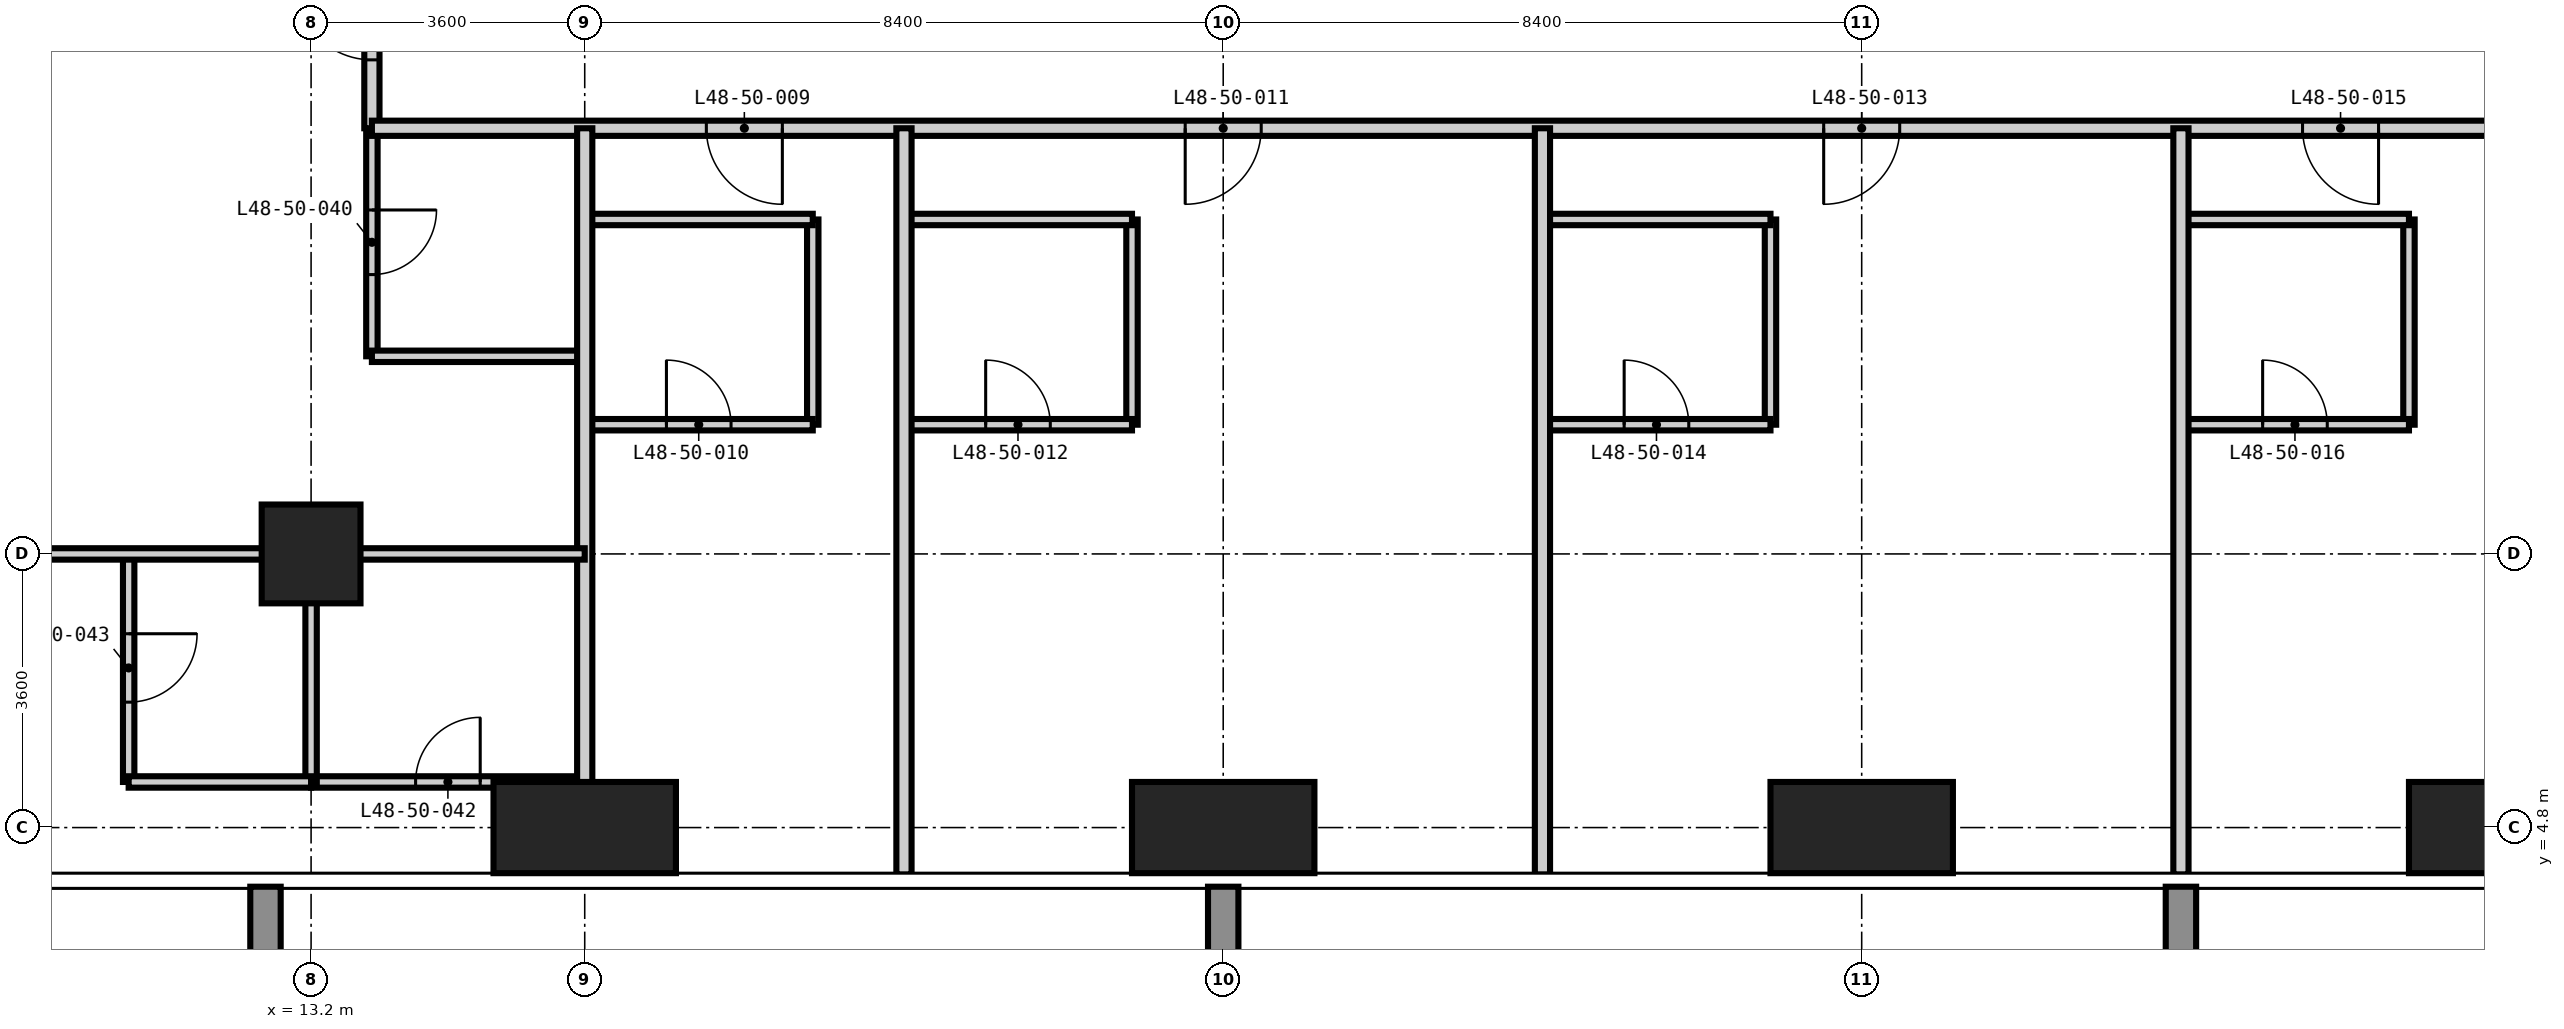
"""IFC4 building model, lengths in metres.
Left out: names, types, materials, properties, quantities, classifications, styles, units other than length and angle.
Written with IfcOpenShell. Run it as: python <this file> out.ifc"""

import sys

from ifc_helpers import new_model, si_unit, direction, frame, frame_2d, origin, origin_2d, place, context, subcontext, project, spatial, rectangle, extrude, element, fill, save


model = new_model("IFC4")
c1 = context("Model", 3, precision=1e-05, world=origin(), true_north=direction((0.0, 1.0)))
c2 = subcontext(c1, "Body", "Model", "MODEL_VIEW")
j1 = project(units=[si_unit("LENGTHUNIT", "METRE"), si_unit("PLANEANGLEUNIT", "RADIAN")], contexts=[c1])
p1 = place(None, origin())
s1 = spatial("IfcSite", under=j1, at=p1, CompositionType="ELEMENT")
p2 = place(p1, origin())
s2 = spatial("IfcBuilding", under=s1, at=p2, CompositionType="ELEMENT")
p3 = place(p2, frame((0.0, 0.0, 187.8)))
s3 = spatial("IfcBuildingStorey", under=s2, at=p3, CompositionType="ELEMENT", Elevation=187.8)
p4 = place(p3, frame((13.2, 8.4, -0.35), z_axis=(0.0, 0.0, 1.0), x_axis=(1.0, 0.0, 0.0)))
e1 = element("IfcColumn", 1, at=p4, inside=s3, PredefinedType="COLUMN", context=c2, shape_type="SweptSolid", body=[
    extrude(rectangle(XDim=1.3, YDim=1.3, at=origin_2d()), origin(), (0.0, 0.0, 1.0), 3.6),
])
for number, where, z_axis, x_axis in (
    (2, (16.8, 4.8, -0.35), (0.0, 0.0, 1.0), (1.0, 0.0, 0.0)),
    (3, (25.2, 4.8, -0.35), (0.0, 0.0, 1.0), (1.0, 0.0, 0.0)),
    (4, (33.6, 4.8, -0.35), (0.0, 0.0, 1.0), (1.0, 0.0, 0.0)),
    (5, (42.0, 4.8, -0.35), (0.0, 0.0, 1.0), (1.0, 0.0, 0.0)),
):
    element("IfcColumn", number, at=place(p3, frame(where, z_axis=z_axis, x_axis=x_axis)), inside=s3, PredefinedType="COLUMN", context=c2, shape_type="SweptSolid", body=[
        extrude(rectangle(XDim=2.4, YDim=1.2, at=origin_2d()), origin(), (0.0, 0.0, 1.0), 3.6),
    ])
p5 = place(p3, frame((14.0, 11.0, 0.0), z_axis=(0.0, 0.0, 1.0), x_axis=(0.0, 1.0, 0.0)))
e6 = element("IfcWall", 6, at=p5, inside=s3, PredefinedType="PARTITIONING", context=c2, shape_type="SweptSolid", body=[
    extrude(rectangle(XDim=3.0, YDim=0.15, at=frame_2d((1.5, 0.0))), origin(), (0.0, 0.0, 1.0), 3.25),
])
p6 = place(p5, frame((1.075, 0.0, 0.0)))
e7 = element("IfcOpeningElement", 7, at=p6, cuts=e6, PredefinedType="OPENING", context=c2, shape_type="SweptSolid", body=[
    extrude(rectangle(XDim=0.85, YDim=2.1, at=frame_2d((0.425, 1.05))), frame((0.0, 0.085, 0.0), z_axis=(0.0, -1.0, 0.0), x_axis=(1.0, 0.0, 0.0)), (0.0, 0.0, 1.0), 0.17),
])
for number, where, z_axis, x_axis in (
    (8, (19.8, 10.1, 0.0), (0.0, 0.0, 1.0), (0.0, 1.0, 0.0)),
    (9, (24.0, 10.1, 0.0), (0.0, 0.0, 1.0), (0.0, 1.0, 0.0)),
    (10, (32.4, 10.1, 0.0), (0.0, 0.0, 1.0), (0.0, 1.0, 0.0)),
    (11, (40.8, 10.1, 0.0), (0.0, 0.0, 1.0), (0.0, 1.0, 0.0)),
):
    element("IfcWall", number, at=place(p3, frame(where, z_axis=z_axis, x_axis=x_axis)), inside=s3, PredefinedType="PARTITIONING", context=c2, shape_type="SweptSolid", body=[
        extrude(rectangle(XDim=2.7, YDim=0.15, at=frame_2d((1.35, 0.0))), origin(), (0.0, 0.0, 1.0), 3.25),
    ])
p7 = place(p3, frame((13.2, 5.4, 0.0), z_axis=(0.0, 0.0, 1.0), x_axis=(1.0, 0.0, 0.0)))
e12 = element("IfcWall", 12, at=p7, inside=s3, PredefinedType="PARTITIONING", context=c2, shape_type="SweptSolid", body=[
    extrude(rectangle(XDim=3.6, YDim=0.15, at=frame_2d((1.8, 0.0))), origin(), (0.0, 0.0, 1.0), 3.25),
])
p8 = place(p7, frame((1.375, 0.0, 0.0)))
e13 = element("IfcOpeningElement", 13, at=p8, cuts=e12, PredefinedType="OPENING", context=c2, shape_type="SweptSolid", body=[
    extrude(rectangle(XDim=0.85, YDim=2.1, at=frame_2d((0.425, 1.05))), frame((0.0, 0.085, 0.0), z_axis=(0.0, -1.0, 0.0), x_axis=(1.0, 0.0, 0.0)), (0.0, 0.0, 1.0), 0.17),
])
p9 = place(p3, frame((16.8, 10.1, 0.0), z_axis=(0.0, 0.0, 1.0), x_axis=(1.0, 0.0, 0.0)))
e14 = element("IfcWall", 14, at=p9, inside=s3, PredefinedType="PARTITIONING", context=c2, shape_type="SweptSolid", body=[
    extrude(rectangle(XDim=3.0, YDim=0.15, at=frame_2d((1.5, 0.0))), origin(), (0.0, 0.0, 1.0), 3.25),
])
p10 = place(p9, frame((1.075, 0.0, 0.0)))
e15 = element("IfcOpeningElement", 15, at=p10, cuts=e14, PredefinedType="OPENING", context=c2, shape_type="SweptSolid", body=[
    extrude(rectangle(XDim=0.85, YDim=2.1, at=frame_2d((0.425, 1.05))), frame((0.0, 0.085, 0.0), z_axis=(0.0, -1.0, 0.0), x_axis=(1.0, 0.0, 0.0)), (0.0, 0.0, 1.0), 0.17),
])
p11 = place(p3, frame((21.0, 10.1, 0.0), z_axis=(0.0, 0.0, 1.0), x_axis=(1.0, 0.0, 0.0)))
e16 = element("IfcWall", 16, at=p11, inside=s3, PredefinedType="PARTITIONING", context=c2, shape_type="SweptSolid", body=[
    extrude(rectangle(XDim=3.0, YDim=0.15, at=frame_2d((1.5, 0.0))), origin(), (0.0, 0.0, 1.0), 3.25),
])
p12 = place(p11, frame((1.075, 0.0, 0.0)))
e17 = element("IfcOpeningElement", 17, at=p12, cuts=e16, PredefinedType="OPENING", context=c2, shape_type="SweptSolid", body=[
    extrude(rectangle(XDim=0.85, YDim=2.1, at=frame_2d((0.425, 1.05))), frame((0.0, 0.085, 0.0), z_axis=(0.0, -1.0, 0.0), x_axis=(1.0, 0.0, 0.0)), (0.0, 0.0, 1.0), 0.17),
])
p13 = place(p3, frame((29.4, 10.1, 0.0), z_axis=(0.0, 0.0, 1.0), x_axis=(1.0, 0.0, 0.0)))
e18 = element("IfcWall", 18, at=p13, inside=s3, PredefinedType="PARTITIONING", context=c2, shape_type="SweptSolid", body=[
    extrude(rectangle(XDim=3.0, YDim=0.15, at=frame_2d((1.5, 0.0))), origin(), (0.0, 0.0, 1.0), 3.25),
])
p14 = place(p13, frame((1.075, 0.0, 0.0)))
e19 = element("IfcOpeningElement", 19, at=p14, cuts=e18, PredefinedType="OPENING", context=c2, shape_type="SweptSolid", body=[
    extrude(rectangle(XDim=0.85, YDim=2.1, at=frame_2d((0.425, 1.05))), frame((0.0, 0.085, 0.0), z_axis=(0.0, -1.0, 0.0), x_axis=(1.0, 0.0, 0.0)), (0.0, 0.0, 1.0), 0.17),
])
p15 = place(p3, frame((37.8, 10.1, 0.0), z_axis=(0.0, 0.0, 1.0), x_axis=(1.0, 0.0, 0.0)))
e20 = element("IfcWall", 20, at=p15, inside=s3, PredefinedType="PARTITIONING", context=c2, shape_type="SweptSolid", body=[
    extrude(rectangle(XDim=3.0, YDim=0.15, at=frame_2d((1.5, 0.0))), origin(), (0.0, 0.0, 1.0), 3.25),
])
p16 = place(p15, frame((1.075, 0.0, 0.0)))
e21 = element("IfcOpeningElement", 21, at=p16, cuts=e20, PredefinedType="OPENING", context=c2, shape_type="SweptSolid", body=[
    extrude(rectangle(XDim=0.85, YDim=2.1, at=frame_2d((0.425, 1.05))), frame((0.0, 0.085, 0.0), z_axis=(0.0, -1.0, 0.0), x_axis=(1.0, 0.0, 0.0)), (0.0, 0.0, 1.0), 0.17),
])
p17 = place(p3, frame((14.0, 11.0, 0.0), z_axis=(0.0, 0.0, 1.0), x_axis=(1.0, 0.0, 0.0)))
e22 = element("IfcWall", 22, at=p17, inside=s3, PredefinedType="PARTITIONING", context=c2, shape_type="SweptSolid", body=[
    extrude(rectangle(XDim=2.8, YDim=0.15, at=frame_2d((1.4, 0.0))), origin(), (0.0, 0.0, 1.0), 3.25),
])
for number, where, z_axis, x_axis in (
    (23, (16.8, 12.8, 0.0), (0.0, 0.0, 1.0), (1.0, 0.0, 0.0)),
    (24, (21.0, 12.8, 0.0), (0.0, 0.0, 1.0), (1.0, 0.0, 0.0)),
    (25, (29.4, 12.8, 0.0), (0.0, 0.0, 1.0), (1.0, 0.0, 0.0)),
    (26, (37.8, 12.8, 0.0), (0.0, 0.0, 1.0), (1.0, 0.0, 0.0)),
):
    element("IfcWall", number, at=place(p3, frame(where, z_axis=z_axis, x_axis=x_axis)), inside=s3, PredefinedType="PARTITIONING", context=c2, shape_type="SweptSolid", body=[
        extrude(rectangle(XDim=3.0, YDim=0.15, at=frame_2d((1.5, 0.0))), origin(), (0.0, 0.0, 1.0), 3.25),
    ])
p18 = place(p3, frame((14.0, 14.0, 0.0), z_axis=(0.0, 0.0, 1.0), x_axis=(0.0, 1.0, 0.0)))
e27 = element("IfcWall", 27, at=p18, inside=s3, PredefinedType="PARTITIONING", context=c2, shape_type="SweptSolid", body=[
    extrude(rectangle(XDim=30.2, YDim=0.2, at=frame_2d((15.1, 0.0))), origin(), (0.0, 0.0, 1.0), 3.25),
])
p19 = place(p18, frame((6.5, 0.0, 0.0)))
e28 = element("IfcOpeningElement", 28, at=p19, cuts=e27, PredefinedType="OPENING", context=c2, shape_type="SweptSolid", body=[
    extrude(rectangle(XDim=1.0, YDim=2.2, at=frame_2d((0.5, 1.1))), frame((0.0, 0.11, 0.0), z_axis=(0.0, -1.0, 0.0), x_axis=(1.0, 0.0, 0.0)), (0.0, 0.0, 1.0), 0.22),
])
p20 = place(p18, frame((14.9, 0.0, 0.0)))
e29 = element("IfcOpeningElement", 29, at=p20, cuts=e27, PredefinedType="OPENING", context=c2, shape_type="SweptSolid", body=[
    extrude(rectangle(XDim=1.0, YDim=2.2, at=frame_2d((0.5, 1.1))), frame((0.0, 0.11, 0.0), z_axis=(0.0, -1.0, 0.0), x_axis=(1.0, 0.0, 0.0)), (0.0, 0.0, 1.0), 0.22),
])
p21 = place(p18, frame((23.3, 0.0, 0.0)))
e30 = element("IfcOpeningElement", 30, at=p21, cuts=e27, PredefinedType="OPENING", context=c2, shape_type="SweptSolid", body=[
    extrude(rectangle(XDim=1.0, YDim=2.2, at=frame_2d((0.5, 1.1))), frame((0.0, 0.11, 0.0), z_axis=(0.0, -1.0, 0.0), x_axis=(1.0, 0.0, 0.0)), (0.0, 0.0, 1.0), 0.22),
])
p22 = place(p18, frame((0.9, 0.0, 0.0)))
e31 = element("IfcOpeningElement", 31, at=p22, cuts=e27, PredefinedType="OPENING", context=c2, shape_type="SweptSolid", body=[
    extrude(rectangle(XDim=1.0, YDim=2.2, at=frame_2d((0.5, 1.1))), frame((0.0, 0.11, 0.0), z_axis=(0.0, -1.0, 0.0), x_axis=(1.0, 0.0, 0.0)), (0.0, 0.0, 1.0), 0.22),
])
p23 = place(p18, frame((28.7, 0.0, 0.0)))
e32 = element("IfcOpeningElement", 32, at=p23, cuts=e27, PredefinedType="OPENING", context=c2, shape_type="SweptSolid", body=[
    extrude(rectangle(XDim=1.0, YDim=2.2, at=frame_2d((0.5, 1.1))), frame((0.0, 0.11, 0.0), z_axis=(0.0, -1.0, 0.0), x_axis=(1.0, 0.0, 0.0)), (0.0, 0.0, 1.0), 0.22),
])
p24 = place(p3, frame((45.4, 14.0, 0.0), z_axis=(0.0, 0.0, 1.0), x_axis=(-1.0, 0.0, 0.0)))
e33 = element("IfcWall", 33, at=p24, inside=s3, PredefinedType="PARTITIONING", context=c2, shape_type="SweptSolid", body=[
    extrude(rectangle(XDim=31.4, YDim=0.2, at=frame_2d((15.7, 0.0))), origin(), (0.0, 0.0, 1.0), 3.25),
])
p25 = place(p24, frame((26.0, 0.0, 0.0)))
e34 = element("IfcOpeningElement", 34, at=p25, cuts=e33, PredefinedType="OPENING", context=c2, shape_type="SweptSolid", body=[
    extrude(rectangle(XDim=1.0, YDim=2.2, at=frame_2d((0.5, 1.1))), frame((0.0, 0.11, 0.0), z_axis=(0.0, -1.0, 0.0), x_axis=(1.0, 0.0, 0.0)), (0.0, 0.0, 1.0), 0.22),
])
p26 = place(p24, frame((19.7, 0.0, 0.0)))
e35 = element("IfcOpeningElement", 35, at=p26, cuts=e33, PredefinedType="OPENING", context=c2, shape_type="SweptSolid", body=[
    extrude(rectangle(XDim=1.0, YDim=2.2, at=frame_2d((0.5, 1.1))), frame((0.0, 0.11, 0.0), z_axis=(0.0, -1.0, 0.0), x_axis=(1.0, 0.0, 0.0)), (0.0, 0.0, 1.0), 0.22),
])
p27 = place(p24, frame((11.3, 0.0, 0.0)))
e36 = element("IfcOpeningElement", 36, at=p27, cuts=e33, PredefinedType="OPENING", context=c2, shape_type="SweptSolid", body=[
    extrude(rectangle(XDim=1.0, YDim=2.2, at=frame_2d((0.5, 1.1))), frame((0.0, 0.11, 0.0), z_axis=(0.0, -1.0, 0.0), x_axis=(1.0, 0.0, 0.0)), (0.0, 0.0, 1.0), 0.22),
])
p28 = place(p24, frame((5.0, 0.0, 0.0)))
e37 = element("IfcOpeningElement", 37, at=p28, cuts=e33, PredefinedType="OPENING", context=c2, shape_type="SweptSolid", body=[
    extrude(rectangle(XDim=1.0, YDim=2.2, at=frame_2d((0.5, 1.1))), frame((0.0, 0.11, 0.0), z_axis=(0.0, -1.0, 0.0), x_axis=(1.0, 0.0, 0.0)), (0.0, 0.0, 1.0), 0.22),
])
for number, where, z_axis, x_axis in (
    (38, (16.8, 4.182, 0.0), (0.0, 0.0, 1.0), (0.0, 1.0, 0.0)),
    (39, (21.0, 4.182, 0.0), (0.0, 0.0, 1.0), (0.0, 1.0, 0.0)),
    (40, (29.4, 4.182, 0.0), (0.0, 0.0, 1.0), (0.0, 1.0, 0.0)),
    (41, (37.8, 4.182, 0.0), (0.0, 0.0, 1.0), (0.0, 1.0, 0.0)),
):
    element("IfcWall", number, at=place(p3, frame(where, z_axis=z_axis, x_axis=x_axis)), inside=s3, PredefinedType="PARTITIONING", context=c2, shape_type="SweptSolid", body=[
        extrude(rectangle(XDim=9.818, YDim=0.2, at=frame_2d((4.909, 0.0))), origin(), (0.0, 0.0, 1.0), 3.25),
    ])
p29 = place(p3, frame((10.8, 5.4, 0.0), z_axis=(0.0, 0.0, 1.0), x_axis=(0.0, 1.0, 0.0)))
e42 = element("IfcWall", 42, at=p29, inside=s3, PredefinedType="PARTITIONING", context=c2, shape_type="SweptSolid", body=[
    extrude(rectangle(XDim=3.0, YDim=0.15, at=frame_2d((1.5, 0.0))), origin(), (0.0, 0.0, 1.0), 3.25),
])
p30 = place(p29, frame((1.05, 0.0, 0.0)))
e43 = element("IfcOpeningElement", 43, at=p30, cuts=e42, PredefinedType="OPENING", context=c2, shape_type="SweptSolid", body=[
    extrude(rectangle(XDim=0.9, YDim=2.1, at=frame_2d((0.45, 1.05))), frame((0.0, 0.085, 0.0), z_axis=(0.0, -1.0, 0.0), x_axis=(1.0, 0.0, 0.0)), (0.0, 0.0, 1.0), 0.17),
])
p31 = place(p3, frame((13.2, 5.4, 0.0), z_axis=(0.0, 0.0, 1.0), x_axis=(0.0, 1.0, 0.0)))
e44 = element("IfcWall", 44, at=p31, inside=s3, PredefinedType="PARTITIONING", context=c2, shape_type="SweptSolid", body=[
    extrude(rectangle(XDim=3.0, YDim=0.15, at=frame_2d((1.5, 0.0))), origin(), (0.0, 0.0, 1.0), 3.25),
])
p32 = place(p3, frame((10.8, 5.4, 0.0), z_axis=(0.0, 0.0, 1.0), x_axis=(1.0, 0.0, 0.0)))
e45 = element("IfcWall", 45, at=p32, inside=s3, PredefinedType="PARTITIONING", context=c2, shape_type="SweptSolid", body=[
    extrude(rectangle(XDim=2.4, YDim=0.15, at=frame_2d((1.2, 0.0))), origin(), (0.0, 0.0, 1.0), 3.25),
])
p33 = place(p3, frame((4.182, 8.4, 0.0), z_axis=(0.0, 0.0, 1.0), x_axis=(1.0, 0.0, 0.0)))
e46 = element("IfcWall", 46, at=p33, inside=s3, PredefinedType="PARTITIONING", context=c2, shape_type="SweptSolid", body=[
    extrude(rectangle(XDim=12.618, YDim=0.15, at=frame_2d((6.309, 0.0))), origin(), (0.0, 0.0, 1.0), 3.25),
])
p34 = place(p33, frame((2.868, 0.0, 0.0)))
e47 = element("IfcOpeningElement", 47, at=p34, cuts=e46, PredefinedType="OPENING", context=c2, shape_type="SweptSolid", body=[
    extrude(rectangle(XDim=0.9, YDim=2.1, at=frame_2d((0.45, 1.05))), frame((0.0, 0.085, 0.0), z_axis=(0.0, -1.0, 0.0), x_axis=(1.0, 0.0, 0.0)), (0.0, 0.0, 1.0), 0.17),
])
p35 = place(p25, origin())
e48 = element("IfcDoor", 48, at=p35, inside=s3, OperationType="SINGLE_SWING_LEFT", PredefinedType="DOOR", context=c2, shape_type="SweptSolid", body=[
    extrude(rectangle(XDim=1.0, YDim=2.2, at=frame_2d((0.5, 1.1))), frame((0.0, 0.025, 0.0), z_axis=(0.0, -1.0, 0.0), x_axis=(1.0, 0.0, 0.0)), (0.0, 0.0, 1.0), 0.05),
])
fill(e34, e48)
p36 = place(p10, origin())
e49 = element("IfcDoor", 49, at=p36, inside=s3, OperationType="SINGLE_SWING_LEFT", PredefinedType="DOOR", context=c2, shape_type="SweptSolid", body=[
    extrude(rectangle(XDim=0.85, YDim=2.1, at=frame_2d((0.425, 1.05))), frame((0.0, 0.025, 0.0), z_axis=(0.0, -1.0, 0.0), x_axis=(1.0, 0.0, 0.0)), (0.0, 0.0, 1.0), 0.05),
])
fill(e15, e49)
p37 = place(p26, origin())
e50 = element("IfcDoor", 50, at=p37, inside=s3, OperationType="SINGLE_SWING_RIGHT", PredefinedType="DOOR", context=c2, shape_type="SweptSolid", body=[
    extrude(rectangle(XDim=1.0, YDim=2.2, at=frame_2d((0.5, 1.1))), frame((0.0, 0.025, 0.0), z_axis=(0.0, -1.0, 0.0), x_axis=(1.0, 0.0, 0.0)), (0.0, 0.0, 1.0), 0.05),
])
fill(e35, e50)
p38 = place(p12, origin())
e51 = element("IfcDoor", 51, at=p38, inside=s3, OperationType="SINGLE_SWING_LEFT", PredefinedType="DOOR", context=c2, shape_type="SweptSolid", body=[
    extrude(rectangle(XDim=0.85, YDim=2.1, at=frame_2d((0.425, 1.05))), frame((0.0, 0.025, 0.0), z_axis=(0.0, -1.0, 0.0), x_axis=(1.0, 0.0, 0.0)), (0.0, 0.0, 1.0), 0.05),
])
fill(e17, e51)
p39 = place(p27, origin())
e52 = element("IfcDoor", 52, at=p39, inside=s3, OperationType="SINGLE_SWING_RIGHT", PredefinedType="DOOR", context=c2, shape_type="SweptSolid", body=[
    extrude(rectangle(XDim=1.0, YDim=2.2, at=frame_2d((0.5, 1.1))), frame((0.0, 0.025, 0.0), z_axis=(0.0, -1.0, 0.0), x_axis=(1.0, 0.0, 0.0)), (0.0, 0.0, 1.0), 0.05),
])
fill(e36, e52)
p40 = place(p14, origin())
e53 = element("IfcDoor", 53, at=p40, inside=s3, OperationType="SINGLE_SWING_LEFT", PredefinedType="DOOR", context=c2, shape_type="SweptSolid", body=[
    extrude(rectangle(XDim=0.85, YDim=2.1, at=frame_2d((0.425, 1.05))), frame((0.0, 0.025, 0.0), z_axis=(0.0, -1.0, 0.0), x_axis=(1.0, 0.0, 0.0)), (0.0, 0.0, 1.0), 0.05),
])
fill(e19, e53)
p41 = place(p28, origin())
e54 = element("IfcDoor", 54, at=p41, inside=s3, OperationType="SINGLE_SWING_LEFT", PredefinedType="DOOR", context=c2, shape_type="SweptSolid", body=[
    extrude(rectangle(XDim=1.0, YDim=2.2, at=frame_2d((0.5, 1.1))), frame((0.0, 0.025, 0.0), z_axis=(0.0, -1.0, 0.0), x_axis=(1.0, 0.0, 0.0)), (0.0, 0.0, 1.0), 0.05),
])
fill(e37, e54)
p42 = place(p16, origin())
e55 = element("IfcDoor", 55, at=p42, inside=s3, OperationType="SINGLE_SWING_LEFT", PredefinedType="DOOR", context=c2, shape_type="SweptSolid", body=[
    extrude(rectangle(XDim=0.85, YDim=2.1, at=frame_2d((0.425, 1.05))), frame((0.0, 0.025, 0.0), z_axis=(0.0, -1.0, 0.0), x_axis=(1.0, 0.0, 0.0)), (0.0, 0.0, 1.0), 0.05),
])
fill(e21, e55)
p43 = place(p22, origin())
e56 = element("IfcDoor", 56, at=p43, inside=s3, OperationType="SINGLE_SWING_RIGHT", PredefinedType="DOOR", context=c2, shape_type="SweptSolid", body=[
    extrude(rectangle(XDim=1.0, YDim=2.2, at=frame_2d((0.5, 1.1))), frame((0.0, 0.025, 0.0), z_axis=(0.0, -1.0, 0.0), x_axis=(1.0, 0.0, 0.0)), (0.0, 0.0, 1.0), 0.05),
])
fill(e31, e56)
p44 = place(p6, frame((0.85, 0.0, 0.0), z_axis=(0.0, 0.0, 1.0), x_axis=(-1.0, 0.0, 0.0)))
e57 = element("IfcDoor", 57, at=p44, inside=s3, OperationType="SINGLE_SWING_LEFT", PredefinedType="DOOR", context=c2, shape_type="SweptSolid", body=[
    extrude(rectangle(XDim=0.85, YDim=2.1, at=frame_2d((0.425, 1.05))), frame((0.0, 0.025, 0.0), z_axis=(0.0, -1.0, 0.0), x_axis=(1.0, 0.0, 0.0)), (0.0, 0.0, 1.0), 0.05),
])
fill(e7, e57)
p45 = place(p8, origin())
e58 = element("IfcDoor", 58, at=p45, inside=s3, OperationType="SINGLE_SWING_RIGHT", PredefinedType="DOOR", context=c2, shape_type="SweptSolid", body=[
    extrude(rectangle(XDim=0.85, YDim=2.1, at=frame_2d((0.425, 1.05))), frame((0.0, 0.025, 0.0), z_axis=(0.0, -1.0, 0.0), x_axis=(1.0, 0.0, 0.0)), (0.0, 0.0, 1.0), 0.05),
])
fill(e13, e58)
p46 = place(p30, frame((0.9, 0.0, 0.0), z_axis=(0.0, 0.0, 1.0), x_axis=(-1.0, 0.0, 0.0)))
e59 = element("IfcDoor", 59, at=p46, inside=s3, OperationType="SINGLE_SWING_LEFT", PredefinedType="DOOR", context=c2, shape_type="SweptSolid", body=[
    extrude(rectangle(XDim=0.9, YDim=2.1, at=frame_2d((0.45, 1.05))), frame((0.0, 0.025, 0.0), z_axis=(0.0, -1.0, 0.0), x_axis=(1.0, 0.0, 0.0)), (0.0, 0.0, 1.0), 0.05),
])
fill(e43, e59)
save(model, sys.argv[1])
